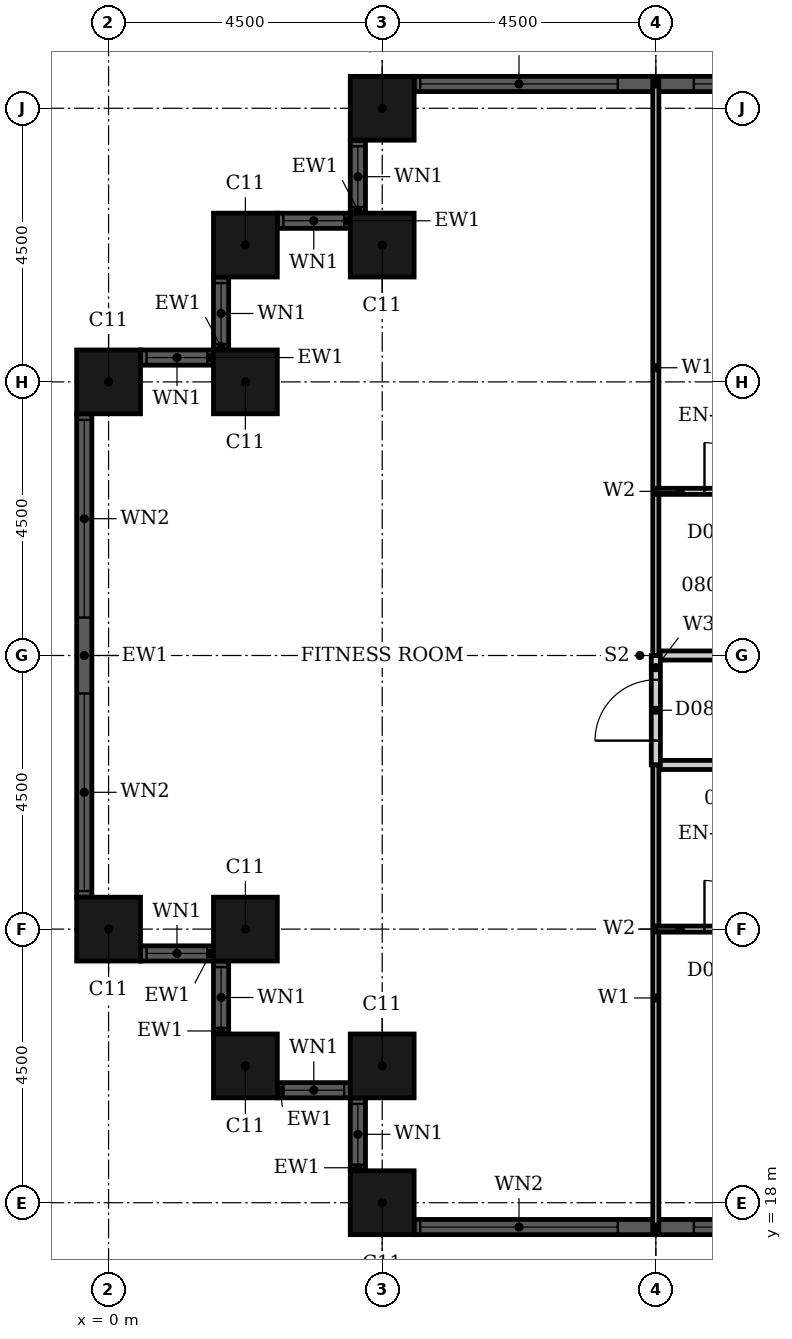
"""IFC4 building model, lengths in metres.
Left out: names, types, materials, properties, quantities, classifications, styles, units other than length and angle.
Written with IfcOpenShell. Run it as: python <this file> out.ifc"""

import sys

from ifc_helpers import new_model, si_unit, direction, frame, frame_2d, origin, origin_2d, place, context, subcontext, project, spatial, rectangle, hollow_rectangle, extrude, element, fill, save


model = new_model("IFC4")
c1 = context("Model", 3, precision=1e-05, world=origin(), true_north=direction((0.0, 1.0)))
c2 = subcontext(c1, "Body", "Model", "MODEL_VIEW")
j1 = project(units=[si_unit("LENGTHUNIT", "METRE"), si_unit("PLANEANGLEUNIT", "RADIAN")], contexts=[c1])
p1 = place(None, origin())
s1 = spatial("IfcSite", under=j1, at=p1, CompositionType="ELEMENT")
p2 = place(p1, origin())
s2 = spatial("IfcBuilding", under=s1, at=p2, CompositionType="ELEMENT")
p3 = place(p2, frame((0.0, 0.0, 40.8)))
s3 = spatial("IfcBuildingStorey", under=s2, at=p3, CompositionType="ELEMENT", Elevation=40.8)
for number, where, z_axis, x_axis in (
    (1, (4.5, 36.0, 0.0), (0.0, 0.0, 1.0), (1.0, 0.0, 0.0)),
    (2, (4.5, 33.75, 0.0), (0.0, 0.0, 1.0), (1.0, 0.0, 0.0)),
    (3, (2.25, 33.75, 0.0), (0.0, 0.0, 1.0), (1.0, 0.0, 0.0)),
    (4, (2.25, 31.5, 0.0), (0.0, 0.0, 1.0), (1.0, 0.0, 0.0)),
    (5, (0.0, 31.5, 0.0), (0.0, 0.0, 1.0), (1.0, 0.0, 0.0)),
    (6, (0.0, 22.5, 0.0), (0.0, 0.0, 1.0), (1.0, 0.0, 0.0)),
    (7, (2.25, 22.5, 0.0), (0.0, 0.0, 1.0), (1.0, 0.0, 0.0)),
    (8, (2.25, 20.25, 0.0), (0.0, 0.0, 1.0), (1.0, 0.0, 0.0)),
    (9, (4.5, 20.25, 0.0), (0.0, 0.0, 1.0), (1.0, 0.0, 0.0)),
    (10, (4.5, 18.0, 0.0), (0.0, 0.0, 1.0), (1.0, 0.0, 0.0)),
):
    element("IfcColumn", number, at=place(p3, frame(where, z_axis=z_axis, x_axis=x_axis)), inside=s3, PredefinedType="COLUMN", context=c2, shape_type="SweptSolid", body=[
        extrude(hollow_rectangle(XDim=1.05, YDim=1.05, WallThickness=0.034, at=origin_2d()), origin(), (0.0, 0.0, 1.0), 3.6),
    ])
p4 = place(p3, frame((12.975, 36.4, 0.0), z_axis=(0.0, 0.0, 1.0), x_axis=(-1.0, 0.0, 0.0)))
e11 = element("IfcWall", 11, at=p4, inside=s3, PredefinedType="SOLIDWALL", context=c2, shape_type="SweptSolid", body=[
    extrude(rectangle(XDim=7.95, YDim=0.25, at=frame_2d((3.975, 0.0))), origin(), (0.0, 0.0, 1.0), 3.6),
])
p5 = place(p4, frame((0.1, 0.0, 0.9)))
e12 = element("IfcOpeningElement", 12, at=p5, cuts=e11, PredefinedType="OPENING", context=c2, shape_type="SweptSolid", body=[
    extrude(rectangle(XDim=3.25, YDim=2.08, at=frame_2d((1.625, 1.04))), frame((0.0, 0.135, 0.0), z_axis=(0.0, -1.0, 0.0), x_axis=(1.0, 0.0, 0.0)), (0.0, 0.0, 1.0), 0.27),
])
p6 = place(p4, frame((4.6, 0.0, 0.9)))
e13 = element("IfcOpeningElement", 13, at=p6, cuts=e11, PredefinedType="OPENING", context=c2, shape_type="SweptSolid", body=[
    extrude(rectangle(XDim=3.25, YDim=2.08, at=frame_2d((1.625, 1.04))), frame((0.0, 0.135, 0.0), z_axis=(0.0, -1.0, 0.0), x_axis=(1.0, 0.0, 0.0)), (0.0, 0.0, 1.0), 0.27),
])
p7 = place(p3, frame((4.1, 35.475, 0.0), z_axis=(0.0, 0.0, 1.0), x_axis=(0.0, -1.0, 0.0)))
e14 = element("IfcWall", 14, at=p7, inside=s3, PredefinedType="SOLIDWALL", context=c2, shape_type="SweptSolid", body=[
    extrude(rectangle(XDim=1.2, YDim=0.25, at=frame_2d((0.6, 0.0))), origin(), (0.0, 0.0, 1.0), 3.6),
])
p8 = place(p7, frame((0.1, 0.0, 0.9)))
e15 = element("IfcOpeningElement", 15, at=p8, cuts=e14, PredefinedType="OPENING", context=c2, shape_type="SweptSolid", body=[
    extrude(rectangle(XDim=1.0, YDim=2.08, at=frame_2d((0.5, 1.04))), frame((0.0, 0.135, 0.0), z_axis=(0.0, -1.0, 0.0), x_axis=(1.0, 0.0, 0.0)), (0.0, 0.0, 1.0), 0.27),
])
p9 = place(p3, frame((3.975, 34.15, 0.0), z_axis=(0.0, 0.0, 1.0), x_axis=(-1.0, 0.0, 0.0)))
e16 = element("IfcWall", 16, at=p9, inside=s3, PredefinedType="SOLIDWALL", context=c2, shape_type="SweptSolid", body=[
    extrude(rectangle(XDim=1.2, YDim=0.25, at=frame_2d((0.6, 0.0))), origin(), (0.0, 0.0, 1.0), 3.6),
])
p10 = place(p9, frame((0.1, 0.0, 0.9)))
e17 = element("IfcOpeningElement", 17, at=p10, cuts=e16, PredefinedType="OPENING", context=c2, shape_type="SweptSolid", body=[
    extrude(rectangle(XDim=1.0, YDim=2.08, at=frame_2d((0.5, 1.04))), frame((0.0, 0.135, 0.0), z_axis=(0.0, -1.0, 0.0), x_axis=(1.0, 0.0, 0.0)), (0.0, 0.0, 1.0), 0.27),
])
p11 = place(p3, frame((1.85, 33.225, 0.0), z_axis=(0.0, 0.0, 1.0), x_axis=(0.0, -1.0, 0.0)))
e18 = element("IfcWall", 18, at=p11, inside=s3, PredefinedType="SOLIDWALL", context=c2, shape_type="SweptSolid", body=[
    extrude(rectangle(XDim=1.2, YDim=0.25, at=frame_2d((0.6, 0.0))), origin(), (0.0, 0.0, 1.0), 3.6),
])
p12 = place(p11, frame((0.1, 0.0, 0.9)))
e19 = element("IfcOpeningElement", 19, at=p12, cuts=e18, PredefinedType="OPENING", context=c2, shape_type="SweptSolid", body=[
    extrude(rectangle(XDim=1.0, YDim=2.08, at=frame_2d((0.5, 1.04))), frame((0.0, 0.135, 0.0), z_axis=(0.0, -1.0, 0.0), x_axis=(1.0, 0.0, 0.0)), (0.0, 0.0, 1.0), 0.27),
])
p13 = place(p3, frame((1.725, 31.9, 0.0), z_axis=(0.0, 0.0, 1.0), x_axis=(-1.0, 0.0, 0.0)))
e20 = element("IfcWall", 20, at=p13, inside=s3, PredefinedType="SOLIDWALL", context=c2, shape_type="SweptSolid", body=[
    extrude(rectangle(XDim=1.2, YDim=0.25, at=frame_2d((0.6, 0.0))), origin(), (0.0, 0.0, 1.0), 3.6),
])
p14 = place(p13, frame((0.1, 0.0, 0.9)))
e21 = element("IfcOpeningElement", 21, at=p14, cuts=e20, PredefinedType="OPENING", context=c2, shape_type="SweptSolid", body=[
    extrude(rectangle(XDim=1.0, YDim=2.08, at=frame_2d((0.5, 1.04))), frame((0.0, 0.135, 0.0), z_axis=(0.0, -1.0, 0.0), x_axis=(1.0, 0.0, 0.0)), (0.0, 0.0, 1.0), 0.27),
])
p15 = place(p3, frame((-0.4, 30.975, 0.0), z_axis=(0.0, 0.0, 1.0), x_axis=(0.0, -1.0, 0.0)))
e22 = element("IfcWall", 22, at=p15, inside=s3, PredefinedType="SOLIDWALL", context=c2, shape_type="SweptSolid", body=[
    extrude(rectangle(XDim=7.95, YDim=0.25, at=frame_2d((3.975, 0.0))), origin(), (0.0, 0.0, 1.0), 3.6),
])
p16 = place(p15, frame((0.1, 0.0, 0.9)))
e23 = element("IfcOpeningElement", 23, at=p16, cuts=e22, PredefinedType="OPENING", context=c2, shape_type="SweptSolid", body=[
    extrude(rectangle(XDim=3.25, YDim=2.08, at=frame_2d((1.625, 1.04))), frame((0.0, 0.135, 0.0), z_axis=(0.0, -1.0, 0.0), x_axis=(1.0, 0.0, 0.0)), (0.0, 0.0, 1.0), 0.27),
])
p17 = place(p15, frame((4.6, 0.0, 0.9)))
e24 = element("IfcOpeningElement", 24, at=p17, cuts=e22, PredefinedType="OPENING", context=c2, shape_type="SweptSolid", body=[
    extrude(rectangle(XDim=3.25, YDim=2.08, at=frame_2d((1.625, 1.04))), frame((0.0, 0.135, 0.0), z_axis=(0.0, -1.0, 0.0), x_axis=(1.0, 0.0, 0.0)), (0.0, 0.0, 1.0), 0.27),
])
p18 = place(p3, frame((0.525, 22.1, 0.0), z_axis=(0.0, 0.0, 1.0), x_axis=(1.0, 0.0, 0.0)))
e25 = element("IfcWall", 25, at=p18, inside=s3, PredefinedType="SOLIDWALL", context=c2, shape_type="SweptSolid", body=[
    extrude(rectangle(XDim=1.2, YDim=0.25, at=frame_2d((0.6, 0.0))), origin(), (0.0, 0.0, 1.0), 3.6),
])
p19 = place(p18, frame((0.1, 0.0, 0.9)))
e26 = element("IfcOpeningElement", 26, at=p19, cuts=e25, PredefinedType="OPENING", context=c2, shape_type="SweptSolid", body=[
    extrude(rectangle(XDim=1.0, YDim=2.08, at=frame_2d((0.5, 1.04))), frame((0.0, 0.135, 0.0), z_axis=(0.0, -1.0, 0.0), x_axis=(1.0, 0.0, 0.0)), (0.0, 0.0, 1.0), 0.27),
])
p20 = place(p3, frame((1.85, 21.975, 0.0), z_axis=(0.0, 0.0, 1.0), x_axis=(0.0, -1.0, 0.0)))
e27 = element("IfcWall", 27, at=p20, inside=s3, PredefinedType="SOLIDWALL", context=c2, shape_type="SweptSolid", body=[
    extrude(rectangle(XDim=1.2, YDim=0.25, at=frame_2d((0.6, 0.0))), origin(), (0.0, 0.0, 1.0), 3.6),
])
p21 = place(p20, frame((0.1, 0.0, 0.9)))
e28 = element("IfcOpeningElement", 28, at=p21, cuts=e27, PredefinedType="OPENING", context=c2, shape_type="SweptSolid", body=[
    extrude(rectangle(XDim=1.0, YDim=2.08, at=frame_2d((0.5, 1.04))), frame((0.0, 0.135, 0.0), z_axis=(0.0, -1.0, 0.0), x_axis=(1.0, 0.0, 0.0)), (0.0, 0.0, 1.0), 0.27),
])
p22 = place(p3, frame((2.775, 19.85, 0.0), z_axis=(0.0, 0.0, 1.0), x_axis=(1.0, 0.0, 0.0)))
e29 = element("IfcWall", 29, at=p22, inside=s3, PredefinedType="SOLIDWALL", context=c2, shape_type="SweptSolid", body=[
    extrude(rectangle(XDim=1.2, YDim=0.25, at=frame_2d((0.6, 0.0))), origin(), (0.0, 0.0, 1.0), 3.6),
])
p23 = place(p22, frame((0.1, 0.0, 0.9)))
e30 = element("IfcOpeningElement", 30, at=p23, cuts=e29, PredefinedType="OPENING", context=c2, shape_type="SweptSolid", body=[
    extrude(rectangle(XDim=1.0, YDim=2.08, at=frame_2d((0.5, 1.04))), frame((0.0, 0.135, 0.0), z_axis=(0.0, -1.0, 0.0), x_axis=(1.0, 0.0, 0.0)), (0.0, 0.0, 1.0), 0.27),
])
p24 = place(p3, frame((4.1, 19.725, 0.0), z_axis=(0.0, 0.0, 1.0), x_axis=(0.0, -1.0, 0.0)))
e31 = element("IfcWall", 31, at=p24, inside=s3, PredefinedType="SOLIDWALL", context=c2, shape_type="SweptSolid", body=[
    extrude(rectangle(XDim=1.2, YDim=0.25, at=frame_2d((0.6, 0.0))), origin(), (0.0, 0.0, 1.0), 3.6),
])
p25 = place(p24, frame((0.1, 0.0, 0.9)))
e32 = element("IfcOpeningElement", 32, at=p25, cuts=e31, PredefinedType="OPENING", context=c2, shape_type="SweptSolid", body=[
    extrude(rectangle(XDim=1.0, YDim=2.08, at=frame_2d((0.5, 1.04))), frame((0.0, 0.135, 0.0), z_axis=(0.0, -1.0, 0.0), x_axis=(1.0, 0.0, 0.0)), (0.0, 0.0, 1.0), 0.27),
])
p26 = place(p3, frame((5.025, 17.6, 0.0), z_axis=(0.0, 0.0, 1.0), x_axis=(1.0, 0.0, 0.0)))
e33 = element("IfcWall", 33, at=p26, inside=s3, PredefinedType="SOLIDWALL", context=c2, shape_type="SweptSolid", body=[
    extrude(rectangle(XDim=7.95, YDim=0.25, at=frame_2d((3.975, 0.0))), origin(), (0.0, 0.0, 1.0), 3.6),
])
p27 = place(p26, frame((0.1, 0.0, 0.9)))
e34 = element("IfcOpeningElement", 34, at=p27, cuts=e33, PredefinedType="OPENING", context=c2, shape_type="SweptSolid", body=[
    extrude(rectangle(XDim=3.25, YDim=2.08, at=frame_2d((1.625, 1.04))), frame((0.0, 0.135, 0.0), z_axis=(0.0, -1.0, 0.0), x_axis=(1.0, 0.0, 0.0)), (0.0, 0.0, 1.0), 0.27),
])
p28 = place(p26, frame((4.6, 0.0, 0.9)))
e35 = element("IfcOpeningElement", 35, at=p28, cuts=e33, PredefinedType="OPENING", context=c2, shape_type="SweptSolid", body=[
    extrude(rectangle(XDim=3.25, YDim=2.08, at=frame_2d((1.625, 1.04))), frame((0.0, 0.135, 0.0), z_axis=(0.0, -1.0, 0.0), x_axis=(1.0, 0.0, 0.0)), (0.0, 0.0, 1.0), 0.27),
])
p29 = place(p3, frame((9.0, 25.2, 0.0), z_axis=(0.0, 0.0, 1.0), x_axis=(1.0, 0.0, 0.0)))
e36 = element("IfcWall", 36, at=p29, inside=s3, PredefinedType="PARTITIONING", context=c2, shape_type="SweptSolid", body=[
    extrude(rectangle(XDim=7.2, YDim=0.15, at=frame_2d((3.6, 0.0))), origin(), (0.0, 0.0, 1.0), 3.3),
])
p30 = place(p29, frame((2.95, 0.0, 0.0)))
e37 = element("IfcOpeningElement", 37, at=p30, cuts=e36, PredefinedType="OPENING", context=c2, shape_type="SweptSolid", body=[
    extrude(rectangle(XDim=1.0, YDim=2.1, at=frame_2d((0.5, 1.05))), frame((0.0, 0.085, 0.0), z_axis=(0.0, -1.0, 0.0), x_axis=(1.0, 0.0, 0.0)), (0.0, 0.0, 1.0), 0.17),
])
p31 = place(p3, frame((9.0, 27.0, 0.0), z_axis=(0.0, 0.0, 1.0), x_axis=(1.0, 0.0, 0.0)))
e38 = element("IfcWall", 38, at=p31, inside=s3, PredefinedType="PARTITIONING", context=c2, shape_type="SweptSolid", body=[
    extrude(rectangle(XDim=7.2, YDim=0.15, at=frame_2d((3.6, 0.0))), origin(), (0.0, 0.0, 1.0), 2.58),
])
p32 = place(p31, frame((2.95, 0.0, 0.0)))
e39 = element("IfcOpeningElement", 39, at=p32, cuts=e38, PredefinedType="OPENING", context=c2, shape_type="SweptSolid", body=[
    extrude(rectangle(XDim=1.0, YDim=2.1, at=frame_2d((0.5, 1.05))), frame((0.0, 0.085, 0.0), z_axis=(0.0, -1.0, 0.0), x_axis=(1.0, 0.0, 0.0)), (0.0, 0.0, 1.0), 0.17),
])
p33 = place(p3, frame((9.0, 25.2, 0.0), z_axis=(0.0, 0.0, 1.0), x_axis=(0.0, 1.0, 0.0)))
e40 = element("IfcWall", 40, at=p33, inside=s3, PredefinedType="PARTITIONING", context=c2, shape_type="SweptSolid", body=[
    extrude(rectangle(XDim=1.8, YDim=0.15, at=frame_2d((0.9, 0.0))), origin(), (0.0, 0.0, 1.0), 3.3),
])
p34 = place(p33, frame((0.4, 0.0, 0.0)))
e41 = element("IfcOpeningElement", 41, at=p34, cuts=e40, PredefinedType="OPENING", context=c2, shape_type="SweptSolid", body=[
    extrude(rectangle(XDim=1.0, YDim=2.1, at=frame_2d((0.5, 1.05))), frame((0.0, 0.085, 0.0), z_axis=(0.0, -1.0, 0.0), x_axis=(1.0, 0.0, 0.0)), (0.0, 0.0, 1.0), 0.17),
])
p35 = place(p3, frame((9.0, 27.0, 0.0), z_axis=(0.0, 0.0, 1.0), x_axis=(0.0, 1.0, 0.0)))
e42 = element("IfcWall", 42, at=p35, inside=s3, PredefinedType="PARTITIONING", context=c2, shape_type="SweptSolid", body=[
    extrude(rectangle(XDim=9.465, YDim=0.1, at=frame_2d((4.732, 0.0))), origin(), (0.0, 0.0, 1.0), 3.3),
])
p36 = place(p3, frame((9.0, 17.535, 0.0), z_axis=(0.0, 0.0, 1.0), x_axis=(0.0, 1.0, 0.0)))
e43 = element("IfcWall", 43, at=p36, inside=s3, PredefinedType="PARTITIONING", context=c2, shape_type="SweptSolid", body=[
    extrude(rectangle(XDim=7.665, YDim=0.1, at=frame_2d((3.833, 0.0))), origin(), (0.0, 0.0, 1.0), 3.3),
])
p37 = place(p3, frame((9.0, 22.5, 0.0), z_axis=(0.0, 0.0, 1.0), x_axis=(1.0, 0.0, 0.0)))
e44 = element("IfcWall", 44, at=p37, inside=s3, PredefinedType="PARTITIONING", context=c2, shape_type="SweptSolid", body=[
    extrude(rectangle(XDim=2.4, YDim=0.1, at=frame_2d((1.2, 0.0))), origin(), (0.0, 0.0, 1.0), 2.58),
])
p38 = place(p37, frame((0.8, 0.0, 0.0)))
e45 = element("IfcOpeningElement", 45, at=p38, cuts=e44, PredefinedType="OPENING", context=c2, shape_type="SweptSolid", body=[
    extrude(rectangle(XDim=0.8, YDim=2.1, at=frame_2d((0.4, 1.05))), frame((0.0, 0.06, 0.0), z_axis=(0.0, -1.0, 0.0), x_axis=(1.0, 0.0, 0.0)), (0.0, 0.0, 1.0), 0.12),
])
p39 = place(p3, frame((9.0, 29.7, 0.0), z_axis=(0.0, 0.0, 1.0), x_axis=(1.0, 0.0, 0.0)))
e46 = element("IfcWall", 46, at=p39, inside=s3, PredefinedType="PARTITIONING", context=c2, shape_type="SweptSolid", body=[
    extrude(rectangle(XDim=2.4, YDim=0.1, at=frame_2d((1.2, 0.0))), origin(), (0.0, 0.0, 1.0), 3.3),
])
p40 = place(p39, frame((0.8, 0.0, 0.0)))
e47 = element("IfcOpeningElement", 47, at=p40, cuts=e46, PredefinedType="OPENING", context=c2, shape_type="SweptSolid", body=[
    extrude(rectangle(XDim=0.8, YDim=2.1, at=frame_2d((0.4, 1.05))), frame((0.0, 0.06, 0.0), z_axis=(0.0, -1.0, 0.0), x_axis=(1.0, 0.0, 0.0)), (0.0, 0.0, 1.0), 0.12),
])
p41 = place(p5, origin())
e48 = element("IfcWindow", 48, at=p41, inside=s3, PartitioningType="SINGLE_PANEL", PredefinedType="WINDOW", context=c2, shape_type="SweptSolid", body=[
    extrude(rectangle(XDim=3.25, YDim=2.08, at=frame_2d((1.625, 1.04))), frame((0.0, 0.03, 0.0), z_axis=(0.0, -1.0, 0.0), x_axis=(1.0, 0.0, 0.0)), (0.0, 0.0, 1.0), 0.06),
])
fill(e12, e48)
p42 = place(p6, origin())
e49 = element("IfcWindow", 49, at=p42, inside=s3, PartitioningType="SINGLE_PANEL", PredefinedType="WINDOW", context=c2, shape_type="SweptSolid", body=[
    extrude(rectangle(XDim=3.25, YDim=2.08, at=frame_2d((1.625, 1.04))), frame((0.0, 0.03, 0.0), z_axis=(0.0, -1.0, 0.0), x_axis=(1.0, 0.0, 0.0)), (0.0, 0.0, 1.0), 0.06),
])
fill(e13, e49)
p43 = place(p8, origin())
e50 = element("IfcWindow", 50, at=p43, inside=s3, PartitioningType="SINGLE_PANEL", PredefinedType="WINDOW", context=c2, shape_type="SweptSolid", body=[
    extrude(rectangle(XDim=1.0, YDim=2.08, at=frame_2d((0.5, 1.04))), frame((0.0, 0.03, 0.0), z_axis=(0.0, -1.0, 0.0), x_axis=(1.0, 0.0, 0.0)), (0.0, 0.0, 1.0), 0.06),
])
fill(e15, e50)
p44 = place(p10, origin())
e51 = element("IfcWindow", 51, at=p44, inside=s3, PartitioningType="SINGLE_PANEL", PredefinedType="WINDOW", context=c2, shape_type="SweptSolid", body=[
    extrude(rectangle(XDim=1.0, YDim=2.08, at=frame_2d((0.5, 1.04))), frame((0.0, 0.03, 0.0), z_axis=(0.0, -1.0, 0.0), x_axis=(1.0, 0.0, 0.0)), (0.0, 0.0, 1.0), 0.06),
])
fill(e17, e51)
p45 = place(p12, origin())
e52 = element("IfcWindow", 52, at=p45, inside=s3, PartitioningType="SINGLE_PANEL", PredefinedType="WINDOW", context=c2, shape_type="SweptSolid", body=[
    extrude(rectangle(XDim=1.0, YDim=2.08, at=frame_2d((0.5, 1.04))), frame((0.0, 0.03, 0.0), z_axis=(0.0, -1.0, 0.0), x_axis=(1.0, 0.0, 0.0)), (0.0, 0.0, 1.0), 0.06),
])
fill(e19, e52)
p46 = place(p14, origin())
e53 = element("IfcWindow", 53, at=p46, inside=s3, PartitioningType="SINGLE_PANEL", PredefinedType="WINDOW", context=c2, shape_type="SweptSolid", body=[
    extrude(rectangle(XDim=1.0, YDim=2.08, at=frame_2d((0.5, 1.04))), frame((0.0, 0.03, 0.0), z_axis=(0.0, -1.0, 0.0), x_axis=(1.0, 0.0, 0.0)), (0.0, 0.0, 1.0), 0.06),
])
fill(e21, e53)
p47 = place(p16, origin())
e54 = element("IfcWindow", 54, at=p47, inside=s3, PartitioningType="SINGLE_PANEL", PredefinedType="WINDOW", context=c2, shape_type="SweptSolid", body=[
    extrude(rectangle(XDim=3.25, YDim=2.08, at=frame_2d((1.625, 1.04))), frame((0.0, 0.03, 0.0), z_axis=(0.0, -1.0, 0.0), x_axis=(1.0, 0.0, 0.0)), (0.0, 0.0, 1.0), 0.06),
])
fill(e23, e54)
p48 = place(p17, origin())
e55 = element("IfcWindow", 55, at=p48, inside=s3, PartitioningType="SINGLE_PANEL", PredefinedType="WINDOW", context=c2, shape_type="SweptSolid", body=[
    extrude(rectangle(XDim=3.25, YDim=2.08, at=frame_2d((1.625, 1.04))), frame((0.0, 0.03, 0.0), z_axis=(0.0, -1.0, 0.0), x_axis=(1.0, 0.0, 0.0)), (0.0, 0.0, 1.0), 0.06),
])
fill(e24, e55)
p49 = place(p19, origin())
e56 = element("IfcWindow", 56, at=p49, inside=s3, PartitioningType="SINGLE_PANEL", PredefinedType="WINDOW", context=c2, shape_type="SweptSolid", body=[
    extrude(rectangle(XDim=1.0, YDim=2.08, at=frame_2d((0.5, 1.04))), frame((0.0, 0.03, 0.0), z_axis=(0.0, -1.0, 0.0), x_axis=(1.0, 0.0, 0.0)), (0.0, 0.0, 1.0), 0.06),
])
fill(e26, e56)
p50 = place(p21, origin())
e57 = element("IfcWindow", 57, at=p50, inside=s3, PartitioningType="SINGLE_PANEL", PredefinedType="WINDOW", context=c2, shape_type="SweptSolid", body=[
    extrude(rectangle(XDim=1.0, YDim=2.08, at=frame_2d((0.5, 1.04))), frame((0.0, 0.03, 0.0), z_axis=(0.0, -1.0, 0.0), x_axis=(1.0, 0.0, 0.0)), (0.0, 0.0, 1.0), 0.06),
])
fill(e28, e57)
p51 = place(p23, origin())
e58 = element("IfcWindow", 58, at=p51, inside=s3, PartitioningType="SINGLE_PANEL", PredefinedType="WINDOW", context=c2, shape_type="SweptSolid", body=[
    extrude(rectangle(XDim=1.0, YDim=2.08, at=frame_2d((0.5, 1.04))), frame((0.0, 0.03, 0.0), z_axis=(0.0, -1.0, 0.0), x_axis=(1.0, 0.0, 0.0)), (0.0, 0.0, 1.0), 0.06),
])
fill(e30, e58)
p52 = place(p25, origin())
e59 = element("IfcWindow", 59, at=p52, inside=s3, PartitioningType="SINGLE_PANEL", PredefinedType="WINDOW", context=c2, shape_type="SweptSolid", body=[
    extrude(rectangle(XDim=1.0, YDim=2.08, at=frame_2d((0.5, 1.04))), frame((0.0, 0.03, 0.0), z_axis=(0.0, -1.0, 0.0), x_axis=(1.0, 0.0, 0.0)), (0.0, 0.0, 1.0), 0.06),
])
fill(e32, e59)
p53 = place(p27, origin())
e60 = element("IfcWindow", 60, at=p53, inside=s3, PartitioningType="SINGLE_PANEL", PredefinedType="WINDOW", context=c2, shape_type="SweptSolid", body=[
    extrude(rectangle(XDim=3.25, YDim=2.08, at=frame_2d((1.625, 1.04))), frame((0.0, 0.03, 0.0), z_axis=(0.0, -1.0, 0.0), x_axis=(1.0, 0.0, 0.0)), (0.0, 0.0, 1.0), 0.06),
])
fill(e34, e60)
p54 = place(p28, origin())
e61 = element("IfcWindow", 61, at=p54, inside=s3, PartitioningType="SINGLE_PANEL", PredefinedType="WINDOW", context=c2, shape_type="SweptSolid", body=[
    extrude(rectangle(XDim=3.25, YDim=2.08, at=frame_2d((1.625, 1.04))), frame((0.0, 0.03, 0.0), z_axis=(0.0, -1.0, 0.0), x_axis=(1.0, 0.0, 0.0)), (0.0, 0.0, 1.0), 0.06),
])
fill(e35, e61)
p55 = place(p38, origin())
e62 = element("IfcDoor", 62, at=p55, inside=s3, OperationType="SINGLE_SWING_RIGHT", PredefinedType="DOOR", context=c2, shape_type="SweptSolid", body=[
    extrude(rectangle(XDim=0.8, YDim=2.1, at=frame_2d((0.4, 1.05))), frame((0.0, 0.025, 0.0), z_axis=(0.0, -1.0, 0.0), x_axis=(1.0, 0.0, 0.0)), (0.0, 0.0, 1.0), 0.05),
])
fill(e45, e62)
p56 = place(p40, origin())
e63 = element("IfcDoor", 63, at=p56, inside=s3, OperationType="SINGLE_SWING_RIGHT", PredefinedType="DOOR", context=c2, shape_type="SweptSolid", body=[
    extrude(rectangle(XDim=0.8, YDim=2.1, at=frame_2d((0.4, 1.05))), frame((0.0, 0.025, 0.0), z_axis=(0.0, -1.0, 0.0), x_axis=(1.0, 0.0, 0.0)), (0.0, 0.0, 1.0), 0.05),
])
fill(e47, e63)
p57 = place(p34, origin())
e64 = element("IfcDoor", 64, at=p57, inside=s3, OperationType="SINGLE_SWING_RIGHT", PredefinedType="DOOR", context=c2, shape_type="SweptSolid", body=[
    extrude(rectangle(XDim=1.0, YDim=2.1, at=frame_2d((0.5, 1.05))), frame((0.0, 0.025, 0.0), z_axis=(0.0, -1.0, 0.0), x_axis=(1.0, 0.0, 0.0)), (0.0, 0.0, 1.0), 0.05),
])
fill(e41, e64)
save(model, sys.argv[1])
